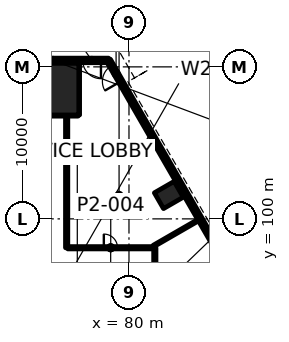
"""IFC4 building model, lengths in metres.
Left out: names, types, materials, properties, quantities, classifications, styles, units other than length and angle.
Written with IfcOpenShell. Run it as: python <this file> out.ifc"""

import sys

from ifc_helpers import new_model, si_unit, direction, frame, frame_2d, origin, origin_2d, place, context, subcontext, project, spatial, rectangle, extrude, element, fill, save


model = new_model("IFC4")
c1 = context("Model", 3, precision=1e-05, world=origin(), true_north=direction((0.0, 1.0)))
c2 = subcontext(c1, "Body", "Model", "MODEL_VIEW")
j1 = project(units=[si_unit("LENGTHUNIT", "METRE"), si_unit("PLANEANGLEUNIT", "RADIAN")], contexts=[c1])
p1 = place(None, origin())
s1 = spatial("IfcSite", under=j1, at=p1, CompositionType="ELEMENT")
p2 = place(p1, origin())
s2 = spatial("IfcBuilding", under=s1, at=p2, CompositionType="ELEMENT")
p3 = place(p2, origin())
s3 = spatial("IfcBuildingStorey", under=s2, at=p3, CompositionType="ELEMENT", Elevation=0.0)
p4 = place(p3, frame((75.0, 108.534, 0.0), z_axis=(0.0, 0.0, 1.0), x_axis=(-1.0, 0.0, 0.0)))
e1 = element("IfcColumn", 1, at=p4, inside=s3, PredefinedType="COLUMN", context=c2, shape_type="SweptSolid", body=[
    extrude(rectangle(XDim=3.4, YDim=3.4, at=origin_2d()), origin(), (0.0, 0.0, 1.0), 8.0),
])
p5 = place(p3, frame((82.621, 101.57, 0.0), z_axis=(0.0, 0.0, 1.0), x_axis=(-0.5, 0.866025403784, 0.0)))
e2 = element("IfcColumn", 2, at=p5, inside=s3, PredefinedType="COLUMN", context=c2, shape_type="SweptSolid", body=[
    extrude(rectangle(XDim=1.2, YDim=1.5, at=origin_2d()), origin(), (0.0, 0.0, 1.0), 8.0),
])
p6 = place(p3, frame((75.975, 98.1, 0.0), z_axis=(0.0, 0.0, 1.0), x_axis=(1.0, 0.0, 0.0)))
e3 = element("IfcWall", 3, at=p6, inside=s3, PredefinedType="PARTITIONING", context=c2, shape_type="SweptSolid", body=[
    extrude(rectangle(XDim=5.649, YDim=0.15, at=frame_2d((2.825, 0.0))), origin(), (0.0, 0.0, 1.0), 7.1),
])
p7 = place(p6, frame((2.371, 0.0, 0.0)))
e4 = element("IfcOpeningElement", 4, at=p7, cuts=e3, PredefinedType="OPENING", context=c2, shape_type="SweptSolid", body=[
    extrude(rectangle(XDim=0.9, YDim=2.1, at=frame_2d((0.45, 1.05))), frame((0.0, 0.085, 0.0), z_axis=(0.0, -1.0, 0.0), x_axis=(1.0, 0.0, 0.0)), (0.0, 0.0, 1.0), 0.17),
])
p8 = place(p3, frame((74.176, 106.834, 0.0), z_axis=(0.0, 0.0, 1.0), x_axis=(1.0, 0.0, 0.0)))
e5 = element("IfcWall", 5, at=p8, inside=s3, PredefinedType="PARTITIONING", context=c2, shape_type="SweptSolid", body=[
    extrude(rectangle(XDim=1.649, YDim=0.15, at=frame_2d((0.825, 0.0))), origin(), (0.0, 0.0, 1.0), 7.097),
])
p9 = place(p3, frame((81.61, 98.215, 0.0), z_axis=(0.0, 0.0, 1.0), x_axis=(0.866004935796, 0.50003544992, 0.0)))
e6 = element("IfcWall", 6, at=p9, inside=s3, PredefinedType="PARTITIONING", context=c2, shape_type="SweptSolid", body=[
    extrude(rectangle(XDim=3.511, YDim=0.1, at=frame_2d((1.755, 0.0))), origin(), (0.0, 0.0, 1.0), 6.865),
])
p10 = place(p3, frame((81.7, 87.5, 0.0), z_axis=(0.0, 0.0, 1.0), x_axis=(0.0, 1.0, 0.0)))
e7 = element("IfcWall", 7, at=p10, inside=s3, PredefinedType="PARTITIONING", context=c2, shape_type="SweptSolid", body=[
    extrude(rectangle(XDim=10.6, YDim=0.15, at=frame_2d((5.3, 0.0))), origin(), (0.0, 0.0, 1.0), 7.1),
])
p11 = place(p3, frame((76.7, 106.834, 0.0), z_axis=(0.0, 0.0, 1.0), x_axis=(0.0, 1.0, 0.0)))
e8 = element("IfcWall", 8, at=p11, inside=s3, PredefinedType="PARTITIONING", context=c2, shape_type="SweptSolid", body=[
    extrude(rectangle(XDim=3.56, YDim=0.1, at=frame_2d((1.78, 0.0))), origin(), (0.0, 0.0, 1.0), 7.1),
])
p12 = place(p3, frame((75.9, 98.1, 0.0), z_axis=(0.0, 0.0, 1.0), x_axis=(0.0, 1.0, 0.0)))
e9 = element("IfcWall", 9, at=p12, inside=s3, PredefinedType="PARTITIONING", context=c2, shape_type="SweptSolid", body=[
    extrude(rectangle(XDim=8.734, YDim=0.15, at=frame_2d((4.367, 0.0))), origin(), (0.0, 0.0, 1.0), 7.1),
])
p13 = place(p3, frame((75.975, 106.834, 0.0), z_axis=(0.0, 0.0, 1.0), x_axis=(1.0, 0.0, 0.0)))
e10 = element("IfcWall", 10, at=p13, inside=s3, PredefinedType="PARTITIONING", context=c2, shape_type="SweptSolid", body=[
    extrude(rectangle(XDim=0.674, YDim=0.15, at=frame_2d((0.337, 0.0))), origin(), (0.0, 0.0, 1.0), 7.1),
])
p14 = place(p3, frame((107.504, 60.451, 0.0), z_axis=(0.0, 0.0, 1.0), x_axis=(-0.500000550228, 0.86602508611, 0.0)))
e11 = element("IfcWall", 11, at=p14, inside=s3, PredefinedType="SOLIDWALL", context=c2, shape_type="SweptSolid", body=[
    extrude(rectangle(XDim=57.704, YDim=0.3, at=frame_2d((28.852, 0.0))), origin(), (0.0, 0.0, 1.0), 7.7),
])
p15 = place(p14, frame((56.104, 0.0, 0.0)))
e12 = element("IfcOpeningElement", 12, at=p15, cuts=e11, PredefinedType="OPENING", context=c2, shape_type="SweptSolid", body=[
    extrude(rectangle(XDim=1.2, YDim=2.4, at=frame_2d((0.6, 1.2))), frame((0.0, 0.16, 0.0), z_axis=(0.0, -1.0, 0.0), x_axis=(1.0, 0.0, 0.0)), (0.0, 0.0, 1.0), 0.32),
])
p16 = place(p14, frame((1.552, 0.0, 0.15)))
e13 = element("IfcOpeningElement", 13, at=p16, cuts=e11, PredefinedType="OPENING", context=c2, shape_type="SweptSolid", body=[
    extrude(rectangle(XDim=2.1, YDim=5.4, at=frame_2d((1.05, 2.7))), frame((0.0, 0.16, 0.0), z_axis=(0.0, -1.0, 0.0), x_axis=(1.0, 0.0, 0.0)), (0.0, 0.0, 1.0), 0.32),
])
p17 = place(p14, frame((4.052, 0.0, 0.15)))
e14 = element("IfcOpeningElement", 14, at=p17, cuts=e11, PredefinedType="OPENING", context=c2, shape_type="SweptSolid", body=[
    extrude(rectangle(XDim=2.1, YDim=5.4, at=frame_2d((1.05, 2.7))), frame((0.0, 0.16, 0.0), z_axis=(0.0, -1.0, 0.0), x_axis=(1.0, 0.0, 0.0)), (0.0, 0.0, 1.0), 0.32),
])
p18 = place(p14, frame((6.552, 0.0, 0.15)))
e15 = element("IfcOpeningElement", 15, at=p18, cuts=e11, PredefinedType="OPENING", context=c2, shape_type="SweptSolid", body=[
    extrude(rectangle(XDim=2.1, YDim=5.4, at=frame_2d((1.05, 2.7))), frame((0.0, 0.16, 0.0), z_axis=(0.0, -1.0, 0.0), x_axis=(1.0, 0.0, 0.0)), (0.0, 0.0, 1.0), 0.32),
])
p19 = place(p14, frame((9.052, 0.0, 0.15)))
e16 = element("IfcOpeningElement", 16, at=p19, cuts=e11, PredefinedType="OPENING", context=c2, shape_type="SweptSolid", body=[
    extrude(rectangle(XDim=2.1, YDim=5.4, at=frame_2d((1.05, 2.7))), frame((0.0, 0.16, 0.0), z_axis=(0.0, -1.0, 0.0), x_axis=(1.0, 0.0, 0.0)), (0.0, 0.0, 1.0), 0.32),
])
p20 = place(p14, frame((11.552, 0.0, 0.15)))
e17 = element("IfcOpeningElement", 17, at=p20, cuts=e11, PredefinedType="OPENING", context=c2, shape_type="SweptSolid", body=[
    extrude(rectangle(XDim=2.1, YDim=5.4, at=frame_2d((1.05, 2.7))), frame((0.0, 0.16, 0.0), z_axis=(0.0, -1.0, 0.0), x_axis=(1.0, 0.0, 0.0)), (0.0, 0.0, 1.0), 0.32),
])
p21 = place(p14, frame((14.052, 0.0, 0.15)))
e18 = element("IfcOpeningElement", 18, at=p21, cuts=e11, PredefinedType="OPENING", context=c2, shape_type="SweptSolid", body=[
    extrude(rectangle(XDim=2.1, YDim=5.4, at=frame_2d((1.05, 2.7))), frame((0.0, 0.16, 0.0), z_axis=(0.0, -1.0, 0.0), x_axis=(1.0, 0.0, 0.0)), (0.0, 0.0, 1.0), 0.32),
])
p22 = place(p14, frame((16.552, 0.0, 0.15)))
e19 = element("IfcOpeningElement", 19, at=p22, cuts=e11, PredefinedType="OPENING", context=c2, shape_type="SweptSolid", body=[
    extrude(rectangle(XDim=2.1, YDim=5.4, at=frame_2d((1.05, 2.7))), frame((0.0, 0.16, 0.0), z_axis=(0.0, -1.0, 0.0), x_axis=(1.0, 0.0, 0.0)), (0.0, 0.0, 1.0), 0.32),
])
p23 = place(p14, frame((19.052, 0.0, 0.15)))
e20 = element("IfcOpeningElement", 20, at=p23, cuts=e11, PredefinedType="OPENING", context=c2, shape_type="SweptSolid", body=[
    extrude(rectangle(XDim=2.1, YDim=5.4, at=frame_2d((1.05, 2.7))), frame((0.0, 0.16, 0.0), z_axis=(0.0, -1.0, 0.0), x_axis=(1.0, 0.0, 0.0)), (0.0, 0.0, 1.0), 0.32),
])
p24 = place(p14, frame((21.552, 0.0, 0.15)))
e21 = element("IfcOpeningElement", 21, at=p24, cuts=e11, PredefinedType="OPENING", context=c2, shape_type="SweptSolid", body=[
    extrude(rectangle(XDim=2.1, YDim=5.4, at=frame_2d((1.05, 2.7))), frame((0.0, 0.16, 0.0), z_axis=(0.0, -1.0, 0.0), x_axis=(1.0, 0.0, 0.0)), (0.0, 0.0, 1.0), 0.32),
])
p25 = place(p14, frame((24.052, 0.0, 0.15)))
e22 = element("IfcOpeningElement", 22, at=p25, cuts=e11, PredefinedType="OPENING", context=c2, shape_type="SweptSolid", body=[
    extrude(rectangle(XDim=2.1, YDim=5.4, at=frame_2d((1.05, 2.7))), frame((0.0, 0.16, 0.0), z_axis=(0.0, -1.0, 0.0), x_axis=(1.0, 0.0, 0.0)), (0.0, 0.0, 1.0), 0.32),
])
p26 = place(p14, frame((26.552, 0.0, 0.15)))
e23 = element("IfcOpeningElement", 23, at=p26, cuts=e11, PredefinedType="OPENING", context=c2, shape_type="SweptSolid", body=[
    extrude(rectangle(XDim=2.1, YDim=5.4, at=frame_2d((1.05, 2.7))), frame((0.0, 0.16, 0.0), z_axis=(0.0, -1.0, 0.0), x_axis=(1.0, 0.0, 0.0)), (0.0, 0.0, 1.0), 0.32),
])
p27 = place(p14, frame((29.052, 0.0, 0.15)))
e24 = element("IfcOpeningElement", 24, at=p27, cuts=e11, PredefinedType="OPENING", context=c2, shape_type="SweptSolid", body=[
    extrude(rectangle(XDim=2.1, YDim=5.4, at=frame_2d((1.05, 2.7))), frame((0.0, 0.16, 0.0), z_axis=(0.0, -1.0, 0.0), x_axis=(1.0, 0.0, 0.0)), (0.0, 0.0, 1.0), 0.32),
])
p28 = place(p14, frame((31.552, 0.0, 0.15)))
e25 = element("IfcOpeningElement", 25, at=p28, cuts=e11, PredefinedType="OPENING", context=c2, shape_type="SweptSolid", body=[
    extrude(rectangle(XDim=2.1, YDim=5.4, at=frame_2d((1.05, 2.7))), frame((0.0, 0.16, 0.0), z_axis=(0.0, -1.0, 0.0), x_axis=(1.0, 0.0, 0.0)), (0.0, 0.0, 1.0), 0.32),
])
p29 = place(p14, frame((34.052, 0.0, 0.15)))
e26 = element("IfcOpeningElement", 26, at=p29, cuts=e11, PredefinedType="OPENING", context=c2, shape_type="SweptSolid", body=[
    extrude(rectangle(XDim=2.1, YDim=5.4, at=frame_2d((1.05, 2.7))), frame((0.0, 0.16, 0.0), z_axis=(0.0, -1.0, 0.0), x_axis=(1.0, 0.0, 0.0)), (0.0, 0.0, 1.0), 0.32),
])
p30 = place(p14, frame((36.552, 0.0, 0.15)))
e27 = element("IfcOpeningElement", 27, at=p30, cuts=e11, PredefinedType="OPENING", context=c2, shape_type="SweptSolid", body=[
    extrude(rectangle(XDim=2.1, YDim=5.4, at=frame_2d((1.05, 2.7))), frame((0.0, 0.16, 0.0), z_axis=(0.0, -1.0, 0.0), x_axis=(1.0, 0.0, 0.0)), (0.0, 0.0, 1.0), 0.32),
])
p31 = place(p14, frame((39.052, 0.0, 0.15)))
e28 = element("IfcOpeningElement", 28, at=p31, cuts=e11, PredefinedType="OPENING", context=c2, shape_type="SweptSolid", body=[
    extrude(rectangle(XDim=2.1, YDim=5.4, at=frame_2d((1.05, 2.7))), frame((0.0, 0.16, 0.0), z_axis=(0.0, -1.0, 0.0), x_axis=(1.0, 0.0, 0.0)), (0.0, 0.0, 1.0), 0.32),
])
p32 = place(p14, frame((41.552, 0.0, 0.15)))
e29 = element("IfcOpeningElement", 29, at=p32, cuts=e11, PredefinedType="OPENING", context=c2, shape_type="SweptSolid", body=[
    extrude(rectangle(XDim=2.1, YDim=5.4, at=frame_2d((1.05, 2.7))), frame((0.0, 0.16, 0.0), z_axis=(0.0, -1.0, 0.0), x_axis=(1.0, 0.0, 0.0)), (0.0, 0.0, 1.0), 0.32),
])
p33 = place(p14, frame((44.052, 0.0, 0.15)))
e30 = element("IfcOpeningElement", 30, at=p33, cuts=e11, PredefinedType="OPENING", context=c2, shape_type="SweptSolid", body=[
    extrude(rectangle(XDim=2.1, YDim=5.4, at=frame_2d((1.05, 2.7))), frame((0.0, 0.16, 0.0), z_axis=(0.0, -1.0, 0.0), x_axis=(1.0, 0.0, 0.0)), (0.0, 0.0, 1.0), 0.32),
])
p34 = place(p14, frame((46.552, 0.0, 0.15)))
e31 = element("IfcOpeningElement", 31, at=p34, cuts=e11, PredefinedType="OPENING", context=c2, shape_type="SweptSolid", body=[
    extrude(rectangle(XDim=2.1, YDim=5.4, at=frame_2d((1.05, 2.7))), frame((0.0, 0.16, 0.0), z_axis=(0.0, -1.0, 0.0), x_axis=(1.0, 0.0, 0.0)), (0.0, 0.0, 1.0), 0.32),
])
p35 = place(p14, frame((49.052, 0.0, 0.15)))
e32 = element("IfcOpeningElement", 32, at=p35, cuts=e11, PredefinedType="OPENING", context=c2, shape_type="SweptSolid", body=[
    extrude(rectangle(XDim=2.1, YDim=5.4, at=frame_2d((1.05, 2.7))), frame((0.0, 0.16, 0.0), z_axis=(0.0, -1.0, 0.0), x_axis=(1.0, 0.0, 0.0)), (0.0, 0.0, 1.0), 0.32),
])
p36 = place(p14, frame((51.552, 0.0, 0.15)))
e33 = element("IfcOpeningElement", 33, at=p36, cuts=e11, PredefinedType="OPENING", context=c2, shape_type="SweptSolid", body=[
    extrude(rectangle(XDim=2.1, YDim=5.4, at=frame_2d((1.05, 2.7))), frame((0.0, 0.16, 0.0), z_axis=(0.0, -1.0, 0.0), x_axis=(1.0, 0.0, 0.0)), (0.0, 0.0, 1.0), 0.32),
])
p37 = place(p3, frame((78.652, 110.424, 0.0), z_axis=(0.0, 0.0, 1.0), x_axis=(-1.0, 0.0, 0.0)))
e34 = element("IfcWall", 34, at=p37, inside=s3, PredefinedType="SOLIDWALL", context=c2, shape_type="SweptSolid", body=[
    extrude(rectangle(XDim=7.304, YDim=0.3, at=frame_2d((3.652, 0.0))), origin(), (0.0, 0.0, 1.0), 7.7),
])
p38 = place(p37, frame((0.496, 0.0, 0.0)))
e35 = element("IfcOpeningElement", 35, at=p38, cuts=e34, PredefinedType="OPENING", context=c2, shape_type="SweptSolid", body=[
    extrude(rectangle(XDim=1.2, YDim=2.4, at=frame_2d((0.6, 1.2))), frame((0.0, 0.16, 0.0), z_axis=(0.0, -1.0, 0.0), x_axis=(1.0, 0.0, 0.0)), (0.0, 0.0, 1.0), 0.32),
])
p39 = place(p37, frame((3.852, 0.0, 0.15)))
e36 = element("IfcOpeningElement", 36, at=p39, cuts=e34, PredefinedType="OPENING", context=c2, shape_type="SweptSolid", body=[
    extrude(rectangle(XDim=2.1, YDim=5.4, at=frame_2d((1.05, 2.7))), frame((0.0, 0.16, 0.0), z_axis=(0.0, -1.0, 0.0), x_axis=(1.0, 0.0, 0.0)), (0.0, 0.0, 1.0), 0.32),
])
p40 = place(p3, frame((107.106, 62.36, 0.0), z_axis=(0.0, 0.0, 1.0), x_axis=(-0.49999992739, 0.866025445706, 0.0)))
e37 = element("IfcWall", 37, at=p40, inside=s3, PredefinedType="SOLIDWALL", context=c2, shape_type="SweptSolid", body=[
    extrude(rectangle(XDim=54.0, YDim=0.4, at=frame_2d((27.0, 0.0))), origin(), (0.0, 0.0, 1.0), 7.64),
])
p41 = place(p3, frame((80.354, 109.095, 0.0), z_axis=(0.0, 0.0, 1.0), x_axis=(0.866026568746, 0.499997982221, 0.0)))
e38 = element("IfcWall", 38, at=p41, inside=s3, PredefinedType="SOLIDWALL", context=c2, shape_type="SweptSolid", body=[
    extrude(rectangle(XDim=29.3, YDim=0.3, at=frame_2d((14.65, 0.0))), origin(), (0.0, 0.0, 1.0), 7.64),
])
p42 = place(p41, frame((0.875, 0.0, 0.0)))
e39 = element("IfcOpeningElement", 39, at=p42, cuts=e38, PredefinedType="OPENING", context=c2, shape_type="SweptSolid", body=[
    extrude(rectangle(XDim=1.2, YDim=2.2, at=frame_2d((0.6, 1.1))), frame((0.0, 0.16, 0.0), z_axis=(0.0, -1.0, 0.0), x_axis=(1.0, 0.0, 0.0)), (0.0, 0.0, 1.0), 0.32),
])
p43 = place(p3, frame((87.635, 102.635, 0.0), z_axis=(0.0, 0.0, 1.0), x_axis=(-0.499994616197, 0.866028512102, 0.0)))
e40 = element("IfcWall", 40, at=p43, inside=s3, PredefinedType="SOLIDWALL", context=c2, shape_type="SweptSolid", body=[
    extrude(rectangle(XDim=9.085, YDim=0.25, at=frame_2d((4.542, 0.0))), origin(), (0.0, 0.0, 1.0), 7.64),
])
p44 = place(p43, frame((7.885, 0.0, 0.0)))
e41 = element("IfcOpeningElement", 41, at=p44, cuts=e40, PredefinedType="OPENING", context=c2, shape_type="SweptSolid", body=[
    extrude(rectangle(XDim=1.0, YDim=2.1, at=frame_2d((0.5, 1.05))), frame((0.0, 0.135, 0.0), z_axis=(0.0, -1.0, 0.0), x_axis=(1.0, 0.0, 0.0)), (0.0, 0.0, 1.0), 0.27),
])
p45 = place(p3, frame((84.972, 101.097, 0.0), z_axis=(0.0, 0.0, 1.0), x_axis=(0.866039495442, 0.49997559174, 0.0)))
e42 = element("IfcWall", 42, at=p45, inside=s3, PredefinedType="SOLIDWALL", context=c2, shape_type="SweptSolid", body=[
    extrude(rectangle(XDim=2.95, YDim=0.25, at=frame_2d((1.475, 0.0))), origin(), (0.0, 0.0, 1.0), 7.64),
])
p46 = place(p7, origin())
e43 = element("IfcDoor", 43, at=p46, inside=s3, OperationType="SINGLE_SWING_LEFT", PredefinedType="DOOR", context=c2, shape_type="SweptSolid", body=[
    extrude(rectangle(XDim=0.9, YDim=2.1, at=frame_2d((0.45, 1.05))), frame((0.0, 0.025, 0.0), z_axis=(0.0, -1.0, 0.0), x_axis=(1.0, 0.0, 0.0)), (0.0, 0.0, 1.0), 0.05),
])
fill(e4, e43)
p47 = place(p15, origin())
e44 = element("IfcDoor", 44, at=p47, inside=s3, OperationType="SINGLE_SWING_LEFT", PredefinedType="DOOR", context=c2, shape_type="SweptSolid", body=[
    extrude(rectangle(XDim=1.2, YDim=2.4, at=frame_2d((0.6, 1.2))), frame((0.0, 0.025, 0.0), z_axis=(0.0, -1.0, 0.0), x_axis=(1.0, 0.0, 0.0)), (0.0, 0.0, 1.0), 0.05),
])
fill(e12, e44)
p48 = place(p33, origin())
e45 = element("IfcWindow", 45, at=p48, inside=s3, PartitioningType="SINGLE_PANEL", PredefinedType="WINDOW", context=c2, shape_type="SweptSolid", body=[
    extrude(rectangle(XDim=2.1, YDim=5.4, at=frame_2d((1.05, 2.7))), frame((0.0, 0.03, 0.0), z_axis=(0.0, -1.0, 0.0), x_axis=(1.0, 0.0, 0.0)), (0.0, 0.0, 1.0), 0.06),
])
fill(e30, e45)
p49 = place(p34, origin())
e46 = element("IfcWindow", 46, at=p49, inside=s3, PartitioningType="SINGLE_PANEL", PredefinedType="WINDOW", context=c2, shape_type="SweptSolid", body=[
    extrude(rectangle(XDim=2.1, YDim=5.4, at=frame_2d((1.05, 2.7))), frame((0.0, 0.03, 0.0), z_axis=(0.0, -1.0, 0.0), x_axis=(1.0, 0.0, 0.0)), (0.0, 0.0, 1.0), 0.06),
])
fill(e31, e46)
p50 = place(p35, origin())
e47 = element("IfcWindow", 47, at=p50, inside=s3, PartitioningType="SINGLE_PANEL", PredefinedType="WINDOW", context=c2, shape_type="SweptSolid", body=[
    extrude(rectangle(XDim=2.1, YDim=5.4, at=frame_2d((1.05, 2.7))), frame((0.0, 0.03, 0.0), z_axis=(0.0, -1.0, 0.0), x_axis=(1.0, 0.0, 0.0)), (0.0, 0.0, 1.0), 0.06),
])
fill(e32, e47)
p51 = place(p36, origin())
e48 = element("IfcWindow", 48, at=p51, inside=s3, PartitioningType="SINGLE_PANEL", PredefinedType="WINDOW", context=c2, shape_type="SweptSolid", body=[
    extrude(rectangle(XDim=2.1, YDim=5.4, at=frame_2d((1.05, 2.7))), frame((0.0, 0.03, 0.0), z_axis=(0.0, -1.0, 0.0), x_axis=(1.0, 0.0, 0.0)), (0.0, 0.0, 1.0), 0.06),
])
fill(e33, e48)
p52 = place(p38, origin())
e49 = element("IfcDoor", 49, at=p52, inside=s3, OperationType="SINGLE_SWING_LEFT", PredefinedType="DOOR", context=c2, shape_type="SweptSolid", body=[
    extrude(rectangle(XDim=1.2, YDim=2.4, at=frame_2d((0.6, 1.2))), frame((0.0, 0.025, 0.0), z_axis=(0.0, -1.0, 0.0), x_axis=(1.0, 0.0, 0.0)), (0.0, 0.0, 1.0), 0.05),
])
fill(e35, e49)
p53 = place(p42, origin())
e50 = element("IfcDoor", 50, at=p53, inside=s3, OperationType="SINGLE_SWING_LEFT", PredefinedType="DOOR", context=c2, shape_type="SweptSolid", body=[
    extrude(rectangle(XDim=1.2, YDim=2.2, at=frame_2d((0.6, 1.1))), frame((0.0, 0.025, 0.0), z_axis=(0.0, -1.0, 0.0), x_axis=(1.0, 0.0, 0.0)), (0.0, 0.0, 1.0), 0.05),
])
fill(e39, e50)
p54 = place(p44, origin())
e51 = element("IfcDoor", 51, at=p54, inside=s3, OperationType="SINGLE_SWING_RIGHT", PredefinedType="DOOR", context=c2, shape_type="SweptSolid", body=[
    extrude(rectangle(XDim=1.0, YDim=2.1, at=frame_2d((0.5, 1.05))), frame((0.0, 0.025, 0.0), z_axis=(0.0, -1.0, 0.0), x_axis=(1.0, 0.0, 0.0)), (0.0, 0.0, 1.0), 0.05),
])
fill(e41, e51)
save(model, sys.argv[1])
